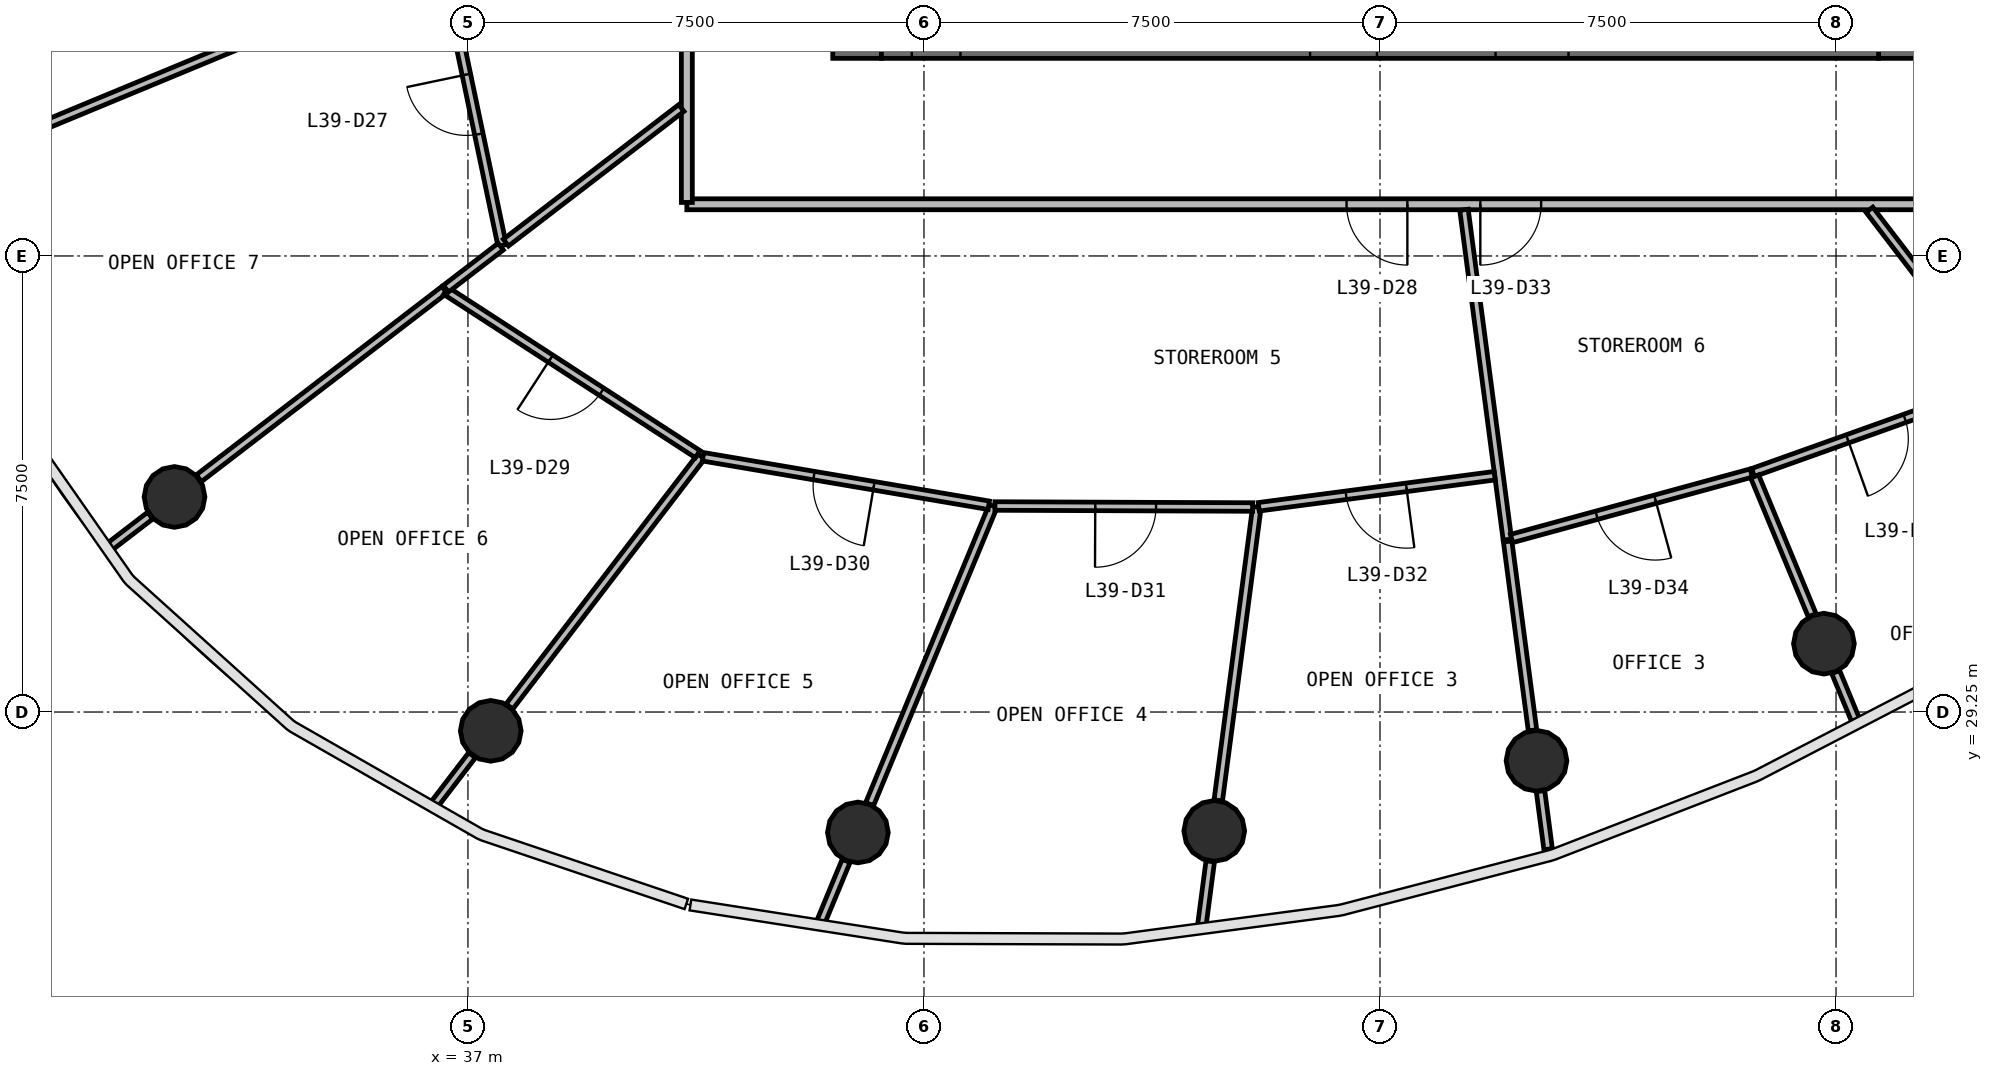
"""IFC4 building model, lengths in metres.
Left out: names, types, materials, properties, quantities, classifications, styles, units other than length and angle.
Written with IfcOpenShell. Run it as: python <this file> out.ifc"""

import sys

from ifc_helpers import new_model, si_unit, direction, frame, frame_2d, origin, origin_2d, place, context, subcontext, project, spatial, rectangle, circle, extrude, source, transform, mapped, element, fill, save


model = new_model("IFC4")
c1 = context("Model", 3, precision=1e-05, world=origin(), true_north=direction((0.0, 1.0)))
c2 = subcontext(c1, "Body", "Model", "MODEL_VIEW")
j1 = project(units=[si_unit("LENGTHUNIT", "METRE"), si_unit("PLANEANGLEUNIT", "RADIAN")], contexts=[c1])
p1 = place(None, origin())
s1 = spatial("IfcSite", under=j1, at=p1, CompositionType="ELEMENT")
p2 = place(p1, origin())
s2 = spatial("IfcBuilding", under=s1, at=p2, CompositionType="ELEMENT")
p3 = place(p2, frame((0.0, 0.0, 164.3)))
s3 = spatial("IfcBuildingStorey", under=s2, at=p3, CompositionType="ELEMENT", Elevation=164.3)
p4 = place(p3, frame((60.6, 40.0, 0.0), z_axis=(0.0, 0.0, 1.0), x_axis=(0.0, 1.0, 0.0)))
e1 = element("IfcWall", 1, at=p4, inside=s3, PredefinedType="SHEAR", context=c2, shape_type="SweptSolid", body=[
    extrude(rectangle(XDim=16.0, YDim=0.8, at=frame_2d((8.0, 0.0))), origin(), (0.0, 0.0, 1.0), 3.9),
])
p5 = place(p4, frame((7.1, 0.0, 0.0)))
e2 = element("IfcOpeningElement", 2, at=p5, cuts=e1, PredefinedType="OPENING", context=c2, shape_type="SweptSolid", body=[
    extrude(rectangle(XDim=1.8, YDim=2.1, at=frame_2d((0.9, 1.05))), frame((0.0, 0.41, 0.0), z_axis=(0.0, -1.0, 0.0), x_axis=(1.0, 0.0, 0.0)), (0.0, 0.0, 1.0), 0.82),
])
p6 = place(p3, frame((43.4, 56.0, 0.0), z_axis=(0.0, 0.0, 1.0), x_axis=(0.0, -1.0, 0.0)))
e3 = element("IfcWall", 3, at=p6, inside=s3, PredefinedType="SHEAR", context=c2, shape_type="SweptSolid", body=[
    extrude(rectangle(XDim=16.0, YDim=0.8, at=frame_2d((8.0, 0.0))), origin(), (0.0, 0.0, 1.0), 3.9),
])
p7 = place(p6, frame((7.1, 0.0, 0.0)))
e4 = element("IfcOpeningElement", 4, at=p7, cuts=e3, PredefinedType="OPENING", context=c2, shape_type="SweptSolid", body=[
    extrude(rectangle(XDim=1.8, YDim=2.1, at=frame_2d((0.9, 1.05))), frame((0.0, 0.41, 0.0), z_axis=(0.0, -1.0, 0.0), x_axis=(1.0, 0.0, 0.0)), (0.0, 0.0, 1.0), 0.82),
])
p8 = place(p3, frame((43.8, 40.4, 0.0), z_axis=(0.0, 0.0, 1.0), x_axis=(1.0, 0.0, 0.0)))
e5 = element("IfcWall", 5, at=p8, inside=s3, PredefinedType="SHEAR", context=c2, shape_type="SweptSolid", body=[
    extrude(rectangle(XDim=16.4, YDim=0.8, at=frame_2d((8.2, 0.0))), origin(), (0.0, 0.0, 1.0), 3.9),
])
p9 = place(p8, frame((10.1, 0.0, 0.0)))
e6 = element("IfcOpeningElement", 6, at=p9, cuts=e5, PredefinedType="OPENING", context=c2, shape_type="SweptSolid", body=[
    extrude(rectangle(XDim=1.2, YDim=2.1, at=frame_2d((0.6, 1.05))), frame((0.0, 0.41, 0.0), z_axis=(0.0, -1.0, 0.0), x_axis=(1.0, 0.0, 0.0)), (0.0, 0.0, 1.0), 0.82),
])
p10 = place(p8, frame((7.05, 0.0, 0.0)))
e7 = element("IfcOpeningElement", 7, at=p10, cuts=e5, PredefinedType="OPENING", context=c2, shape_type="SweptSolid", body=[
    extrude(rectangle(XDim=1.1, YDim=2.1, at=frame_2d((0.55, 1.05))), frame((0.0, 0.41, 0.0), z_axis=(0.0, -1.0, 0.0), x_axis=(1.0, 0.0, 0.0)), (0.0, 0.0, 1.0), 0.82),
])
p11 = place(p8, frame((0.5, 0.0, 0.0)))
e8 = element("IfcOpeningElement", 8, at=p11, cuts=e5, PredefinedType="OPENING", context=c2, shape_type="SweptSolid", body=[
    extrude(rectangle(XDim=0.8, YDim=2.1, at=frame_2d((0.4, 1.05))), frame((0.0, 0.41, 0.0), z_axis=(0.0, -1.0, 0.0), x_axis=(1.0, 0.0, 0.0)), (0.0, 0.0, 1.0), 0.82),
])
m1 = source(origin(), c2, "Body", "SweptSolid", [
    extrude(circle(Radius=0.5, at=origin_2d()), origin(), (0.0, 0.0, 1.0), 3.9),
])
for number, where, z_axis, x_axis in (
    (9, (32.174, 32.787, 0.0), (0.0, 0.0, 1.0), (1.0, 0.0, 0.0)),
    (10, (37.375, 28.94, 0.0), (0.0, 0.0, 1.0), (1.0, 0.0, 0.0)),
    (11, (43.413, 27.269, 0.0), (0.0, 0.0, 1.0), (1.0, 0.0, 0.0)),
    (12, (49.274, 27.295, 0.0), (0.0, 0.0, 1.0), (1.0, 0.0, 0.0)),
    (13, (54.574, 28.449, 0.0), (0.0, 0.0, 1.0), (1.0, 0.0, 0.0)),
    (14, (59.301, 30.374, 0.0), (0.0, 0.0, 1.0), (1.0, 0.0, 0.0)),
):
    element("IfcColumn", number, at=place(p3, frame(where, z_axis=z_axis, x_axis=x_axis)), inside=s3, PredefinedType="COLUMN", context=c2, shape_type="MappedRepresentation", body=[
        mapped(m1, transform((0.0, 0.0, 0.0), scale=1.0)),
    ])
p12 = place(p3, frame((63.4, 37.6, 0.0), z_axis=(0.0, 0.0, 1.0), x_axis=(-1.0, 0.0, 0.0)))
e15 = element("IfcWall", 15, at=p12, inside=s3, PredefinedType="PARTITIONING", context=c2, shape_type="SweptSolid", body=[
    extrude(rectangle(XDim=22.8, YDim=0.18, at=frame_2d((11.4, 0.0))), origin(), (0.0, 0.0, 1.0), 2.88),
])
p13 = place(p12, frame((10.95, 0.0, 0.0)))
e16 = element("IfcOpeningElement", 16, at=p13, cuts=e15, PredefinedType="OPENING", context=c2, shape_type="SweptSolid", body=[
    extrude(rectangle(XDim=1.0, YDim=2.1, at=frame_2d((0.5, 1.05))), frame((0.0, 0.1, 0.0), z_axis=(0.0, -1.0, 0.0), x_axis=(1.0, 0.0, 0.0)), (0.0, 0.0, 1.0), 0.2),
])
p14 = place(p12, frame((8.75, 0.0, 0.0)))
e17 = element("IfcOpeningElement", 17, at=p14, cuts=e15, PredefinedType="OPENING", context=c2, shape_type="SweptSolid", body=[
    extrude(rectangle(XDim=1.0, YDim=2.1, at=frame_2d((0.5, 1.05))), frame((0.0, 0.1, 0.0), z_axis=(0.0, -1.0, 0.0), x_axis=(1.0, 0.0, 0.0)), (0.0, 0.0, 1.0), 0.2),
])
p15 = place(p3, frame((40.6, 37.63, 0.0), z_axis=(0.0, 0.0, 1.0), x_axis=(0.0, 1.0, 0.0)))
e18 = element("IfcWall", 18, at=p15, inside=s3, PredefinedType="PARTITIONING", context=c2, shape_type="SweptSolid", body=[
    extrude(rectangle(XDim=20.74, YDim=0.18, at=frame_2d((10.37, 0.0))), origin(), (0.0, 0.0, 1.0), 2.88),
])
p16 = place(p15, frame((12.09, 0.0, 0.0)))
e19 = element("IfcOpeningElement", 19, at=p16, cuts=e18, PredefinedType="OPENING", context=c2, shape_type="SweptSolid", body=[
    extrude(rectangle(XDim=1.0, YDim=2.1, at=frame_2d((0.5, 1.05))), frame((0.0, 0.1, 0.0), z_axis=(0.0, -1.0, 0.0), x_axis=(1.0, 0.0, 0.0)), (0.0, 0.0, 1.0), 0.2),
])
p17 = place(p15, frame((9.89, 0.0, 0.0)))
e20 = element("IfcOpeningElement", 20, at=p17, cuts=e18, PredefinedType="OPENING", context=c2, shape_type="SweptSolid", body=[
    extrude(rectangle(XDim=1.0, YDim=2.1, at=frame_2d((0.5, 1.05))), frame((0.0, 0.1, 0.0), z_axis=(0.0, -1.0, 0.0), x_axis=(1.0, 0.0, 0.0)), (0.0, 0.0, 1.0), 0.2),
])
p18 = place(p3, frame((36.58, 41.613, 0.0), z_axis=(0.0, 0.0, 1.0), x_axis=(-0.923884663142, -0.382671045691, 0.0)))
e21 = element("IfcWall", 21, at=p18, inside=s3, PredefinedType="PARTITIONING", context=c2, shape_type="SweptSolid", body=[
    extrude(rectangle(XDim=7.047, YDim=0.14, at=frame_2d((3.523, 0.0))), origin(), (0.0, 0.0, 1.0), 2.88),
])
p19 = place(p3, frame((53.381, 37.51, 0.0), z_axis=(0.0, 0.0, 1.0), x_axis=(0.130500676988, -0.991448220184, 0.0)))
e22 = element("IfcWall", 22, at=p19, inside=s3, PredefinedType="PARTITIONING", context=c2, shape_type="SweptSolid", body=[
    extrude(rectangle(XDim=5.472, YDim=0.14, at=frame_2d((2.736, 0.0))), origin(), (0.0, 0.0, 1.0), 2.88),
])
p20 = place(p3, frame((45.637, 32.638, 0.0), z_axis=(0.0, 0.0, 1.0), x_axis=(-0.382690400947, -0.923876645999, 0.0)))
e23 = element("IfcWall", 23, at=p20, inside=s3, PredefinedType="PARTITIONING", context=c2, shape_type="SweptSolid", body=[
    extrude(rectangle(XDim=5.307, YDim=0.14, at=frame_2d((2.653, 0.0))), origin(), (0.0, 0.0, 1.0), 2.88),
])
p21 = place(p3, frame((40.837, 33.453, 0.0), z_axis=(0.0, 0.0, 1.0), x_axis=(-0.608781556018, -0.793337895888, 0.0)))
e24 = element("IfcWall", 24, at=p21, inside=s3, PredefinedType="PARTITIONING", context=c2, shape_type="SweptSolid", body=[
    extrude(rectangle(XDim=5.183, YDim=0.14, at=frame_2d((2.591, 0.0))), origin(), (0.0, 0.0, 1.0), 2.88),
])
p22 = place(p3, frame((36.614, 36.194, 0.0), z_axis=(0.0, 0.0, 1.0), x_axis=(-0.793380951851, -0.608725443234, 0.0)))
e25 = element("IfcWall", 25, at=p22, inside=s3, PredefinedType="PARTITIONING", context=c2, shape_type="SweptSolid", body=[
    extrude(rectangle(XDim=5.092, YDim=0.14, at=frame_2d((2.546, 0.0))), origin(), (0.0, 0.0, 1.0), 2.88),
])
p23 = place(p3, frame((40.779, 33.491, 0.0), z_axis=(0.0, 0.0, 1.0), x_axis=(-0.83885932545, 0.544348263619, 0.0)))
e26 = element("IfcWall", 26, at=p23, inside=s3, PredefinedType="PARTITIONING", context=c2, shape_type="SweptSolid", body=[
    extrude(rectangle(XDim=4.935, YDim=0.14, at=frame_2d((2.467, 0.0))), origin(), (0.0, 0.0, 1.0), 2.88),
])
p24 = place(p23, frame((1.885, 0.0, 0.0)))
e27 = element("IfcOpeningElement", 27, at=p24, cuts=e26, PredefinedType="OPENING", context=c2, shape_type="SweptSolid", body=[
    extrude(rectangle(XDim=1.0, YDim=2.1, at=frame_2d((0.5, 1.05))), frame((0.0, 0.08, 0.0), z_axis=(0.0, -1.0, 0.0), x_axis=(1.0, 0.0, 0.0)), (0.0, 0.0, 1.0), 0.16),
])
p25 = place(p3, frame((45.566, 32.65, 0.0), z_axis=(0.0, 0.0, 1.0), x_axis=(-0.985899482127, 0.167338612225, 0.0)))
e28 = element("IfcWall", 28, at=p25, inside=s3, PredefinedType="PARTITIONING", context=c2, shape_type="SweptSolid", body=[
    extrude(rectangle(XDim=4.766, YDim=0.14, at=frame_2d((2.383, 0.0))), origin(), (0.0, 0.0, 1.0), 2.88),
])
p26 = place(p25, frame((1.916, 0.0, 0.0)))
e29 = element("IfcOpeningElement", 29, at=p26, cuts=e28, PredefinedType="OPENING", context=c2, shape_type="SweptSolid", body=[
    extrude(rectangle(XDim=1.0, YDim=2.1, at=frame_2d((0.5, 1.05))), frame((0.0, 0.08, 0.0), z_axis=(0.0, -1.0, 0.0), x_axis=(1.0, 0.0, 0.0)), (0.0, 0.0, 1.0), 0.16),
])
p27 = place(p3, frame((49.975, 32.621, 0.0), z_axis=(0.0, 0.0, 1.0), x_axis=(-0.130550517866, -0.991441658538, 0.0)))
e30 = element("IfcWall", 30, at=p27, inside=s3, PredefinedType="PARTITIONING", context=c2, shape_type="SweptSolid", body=[
    extrude(rectangle(XDim=4.868, YDim=0.14, at=frame_2d((2.434, 0.0))), origin(), (0.0, 0.0, 1.0), 2.88),
])
p28 = place(p3, frame((37.563, 36.922, 0.0), z_axis=(0.0, 0.0, 1.0), x_axis=(-0.205017521869, 0.978758303018, 0.0)))
e31 = element("IfcWall", 31, at=p28, inside=s3, PredefinedType="PARTITIONING", context=c2, shape_type="SweptSolid", body=[
    extrude(rectangle(XDim=4.722, YDim=0.14, at=frame_2d((2.361, 0.0))), origin(), (0.0, 0.0, 1.0), 2.88),
])
p29 = place(p28, frame((1.872, 0.0, 0.0)))
e32 = element("IfcOpeningElement", 32, at=p29, cuts=e31, PredefinedType="OPENING", context=c2, shape_type="SweptSolid", body=[
    extrude(rectangle(XDim=1.0, YDim=2.1, at=frame_2d((0.5, 1.05))), frame((0.0, 0.08, 0.0), z_axis=(0.0, -1.0, 0.0), x_axis=(1.0, 0.0, 0.0)), (0.0, 0.0, 1.0), 0.16),
])
p30 = place(p3, frame((62.242, 34.653, 0.0), z_axis=(0.0, 0.0, 1.0), x_axis=(-0.94188625398, -0.335931964187, 0.0)))
e33 = element("IfcWall", 33, at=p30, inside=s3, PredefinedType="PARTITIONING", context=c2, shape_type="SweptSolid", body=[
    extrude(rectangle(XDim=4.36, YDim=0.14, at=frame_2d((2.18, 0.0))), origin(), (0.0, 0.0, 1.0), 2.88),
])
p31 = place(p30, frame((1.71, 0.0, 0.0)))
e34 = element("IfcOpeningElement", 34, at=p31, cuts=e33, PredefinedType="OPENING", context=c2, shape_type="SweptSolid", body=[
    extrude(rectangle(XDim=1.0, YDim=2.1, at=frame_2d((0.5, 1.05))), frame((0.0, 0.08, 0.0), z_axis=(0.0, -1.0, 0.0), x_axis=(1.0, 0.0, 0.0)), (0.0, 0.0, 1.0), 0.16),
])
p32 = place(p3, frame((49.905, 32.621, 0.0), z_axis=(0.0, 0.0, 1.0), x_axis=(-0.999992326677, 0.003917471956, 0.0)))
e35 = element("IfcWall", 35, at=p32, inside=s3, PredefinedType="PARTITIONING", context=c2, shape_type="SweptSolid", body=[
    extrude(rectangle(XDim=4.238, YDim=0.14, at=frame_2d((2.119, 0.0))), origin(), (0.0, 0.0, 1.0), 2.88),
])
p33 = place(p32, frame((1.588, 0.0, 0.0)))
e36 = element("IfcOpeningElement", 36, at=p33, cuts=e35, PredefinedType="OPENING", context=c2, shape_type="SweptSolid", body=[
    extrude(rectangle(XDim=1.0, YDim=2.1, at=frame_2d((0.5, 1.05))), frame((0.0, 0.08, 0.0), z_axis=(0.0, -1.0, 0.0), x_axis=(1.0, 0.0, 0.0)), (0.0, 0.0, 1.0), 0.16),
])
p34 = place(p3, frame((54.099, 32.055, 0.0), z_axis=(0.0, 0.0, 1.0), x_axis=(0.130525064179, -0.991445009883, 0.0)))
e37 = element("IfcWall", 37, at=p34, inside=s3, PredefinedType="PARTITIONING", context=c2, shape_type="SweptSolid", body=[
    extrude(rectangle(XDim=3.133, YDim=0.14, at=frame_2d((1.566, 0.0))), origin(), (0.0, 0.0, 1.0), 2.88),
])
p35 = place(p3, frame((58.106, 33.18, 0.0), z_axis=(0.0, 0.0, 1.0), x_axis=(-0.96465070337, -0.263531820636, 0.0)))
e38 = element("IfcWall", 38, at=p35, inside=s3, PredefinedType="PARTITIONING", context=c2, shape_type="SweptSolid", body=[
    extrude(rectangle(XDim=4.087, YDim=0.14, at=frame_2d((2.044, 0.0))), origin(), (0.0, 0.0, 1.0), 2.88),
])
p36 = place(p35, frame((1.637, 0.0, 0.0)))
e39 = element("IfcOpeningElement", 39, at=p36, cuts=e38, PredefinedType="OPENING", context=c2, shape_type="SweptSolid", body=[
    extrude(rectangle(XDim=1.0, YDim=2.1, at=frame_2d((0.5, 1.05))), frame((0.0, 0.08, 0.0), z_axis=(0.0, -1.0, 0.0), x_axis=(1.0, 0.0, 0.0)), (0.0, 0.0, 1.0), 0.16),
])
p37 = place(p3, frame((53.886, 33.136, 0.0), z_axis=(0.0, 0.0, 1.0), x_axis=(-0.991436881293, -0.130586792642, 0.0)))
e40 = element("IfcWall", 40, at=p37, inside=s3, PredefinedType="PARTITIONING", context=c2, shape_type="SweptSolid", body=[
    extrude(rectangle(XDim=3.915, YDim=0.14, at=frame_2d((1.958, 0.0))), origin(), (0.0, 0.0, 1.0), 2.88),
])
p38 = place(p37, frame((1.465, 0.0, 0.0)))
e41 = element("IfcOpeningElement", 41, at=p38, cuts=e40, PredefinedType="OPENING", context=c2, shape_type="SweptSolid", body=[
    extrude(rectangle(XDim=1.0, YDim=2.1, at=frame_2d((0.5, 1.05))), frame((0.0, 0.08, 0.0), z_axis=(0.0, -1.0, 0.0), x_axis=(1.0, 0.0, 0.0)), (0.0, 0.0, 1.0), 0.16),
])
p39 = place(p3, frame((40.51, 39.183, 0.0), z_axis=(0.0, 0.0, 1.0), x_axis=(-0.793354561545, -0.608759837436, 0.0)))
e42 = element("IfcWall", 42, at=p39, inside=s3, PredefinedType="PARTITIONING", context=c2, shape_type="SweptSolid", body=[
    extrude(rectangle(XDim=3.637, YDim=0.14, at=frame_2d((1.819, 0.0))), origin(), (0.0, 0.0, 1.0), 2.88),
])
p40 = place(p3, frame((60.049, 37.51, 0.0), z_axis=(0.0, 0.0, 1.0), x_axis=(0.608763032439, -0.793352109933, 0.0)))
e43 = element("IfcWall", 43, at=p40, inside=s3, PredefinedType="PARTITIONING", context=c2, shape_type="SweptSolid", body=[
    extrude(rectangle(XDim=3.076, YDim=0.14, at=frame_2d((1.538, 0.0))), origin(), (0.0, 0.0, 1.0), 2.88),
])
p41 = place(p3, frame((58.162, 33.124, 0.0), z_axis=(0.0, 0.0, 1.0), x_axis=(0.382692135528, -0.923875927495, 0.0)))
e44 = element("IfcWall", 44, at=p41, inside=s3, PredefinedType="PARTITIONING", context=c2, shape_type="SweptSolid", body=[
    extrude(rectangle(XDim=2.471, YDim=0.14, at=frame_2d((1.235, 0.0))), origin(), (0.0, 0.0, 1.0), 2.88),
])
p42 = place(p3, frame((37.539, 36.904, 0.0), z_axis=(0.0, 0.0, 1.0), x_axis=(-0.793326215903, -0.608796776569, 0.0)))
e45 = element("IfcWall", 45, at=p42, inside=s3, PredefinedType="PARTITIONING", context=c2, shape_type="SweptSolid", body=[
    extrude(rectangle(XDim=1.136, YDim=0.14, at=frame_2d((0.568, 0.0))), origin(), (0.0, 0.0, 1.0), 2.88),
])
p43 = place(p3, frame((43.22, 26.802, 0.0), z_axis=(0.0, 0.0, 1.0), x_axis=(-0.382724096228, -0.923862687939, 0.0)))
e46 = element("IfcWall", 46, at=p43, inside=s3, PredefinedType="PARTITIONING", context=c2, shape_type="SweptSolid", body=[
    extrude(rectangle(XDim=1.1, YDim=0.14, at=frame_2d((0.55, 0.0))), origin(), (0.0, 0.0, 1.0), 2.88),
])
p44 = place(p3, frame((49.208, 26.795, 0.0), z_axis=(0.0, 0.0, 1.0), x_axis=(-0.130561919254, -0.991440157166, 0.0)))
e47 = element("IfcWall", 47, at=p44, inside=s3, PredefinedType="PARTITIONING", context=c2, shape_type="SweptSolid", body=[
    extrude(rectangle(XDim=1.058, YDim=0.14, at=frame_2d((0.529, 0.0))), origin(), (0.0, 0.0, 1.0), 2.88),
])
p45 = place(p3, frame((37.068, 28.54, 0.0), z_axis=(0.0, 0.0, 1.0), x_axis=(-0.608710939512, -0.793392079692, 0.0)))
e48 = element("IfcWall", 48, at=p45, inside=s3, PredefinedType="PARTITIONING", context=c2, shape_type="SweptSolid", body=[
    extrude(rectangle(XDim=1.027, YDim=0.14, at=frame_2d((0.514, 0.0))), origin(), (0.0, 0.0, 1.0), 2.88),
])
p46 = place(p3, frame((54.64, 27.948, 0.0), z_axis=(0.0, 0.0, 1.0), x_axis=(0.130303682633, -0.991474129916, 0.0)))
e49 = element("IfcWall", 49, at=p46, inside=s3, PredefinedType="PARTITIONING", context=c2, shape_type="SweptSolid", body=[
    extrude(rectangle(XDim=0.963, YDim=0.14, at=frame_2d((0.481, 0.0))), origin(), (0.0, 0.0, 1.0), 2.88),
])
p47 = place(p3, frame((59.494, 29.908, 0.0), z_axis=(0.0, 0.0, 1.0), x_axis=(0.38261179702, -0.923909201589, 0.0)))
e50 = element("IfcWall", 50, at=p47, inside=s3, PredefinedType="PARTITIONING", context=c2, shape_type="SweptSolid", body=[
    extrude(rectangle(XDim=0.857, YDim=0.14, at=frame_2d((0.428, 0.0))), origin(), (0.0, 0.0, 1.0), 2.88),
])
p48 = place(p3, frame((31.774, 32.48, 0.0), z_axis=(0.0, 0.0, 1.0), x_axis=(-0.793240633291, -0.608908283484, 0.0)))
e51 = element("IfcWall", 51, at=p48, inside=s3, PredefinedType="PARTITIONING", context=c2, shape_type="SweptSolid", body=[
    extrude(rectangle(XDim=0.838, YDim=0.14, at=frame_2d((0.419, 0.0))), origin(), (0.0, 0.0, 1.0), 2.88),
])
m2 = source(origin(), c2, "Body", "SweptSolid", [
    extrude(rectangle(XDim=1.0, YDim=2.1, at=frame_2d((0.5, 1.05))), frame((0.0, 0.025, 0.0), z_axis=(0.0, -1.0, 0.0), x_axis=(1.0, 0.0, 0.0)), (0.0, 0.0, 1.0), 0.05),
])
p49 = place(p29, origin())
e52 = element("IfcDoor", 52, at=p49, inside=s3, OperationType="SINGLE_SWING_RIGHT", PredefinedType="DOOR", context=c2, shape_type="MappedRepresentation", body=[
    mapped(m2, transform((0.0, 0.0, 0.0), scale=1.0)),
])
fill(e32, e52)
p50 = place(p13, origin())
e53 = element("IfcDoor", 53, at=p50, inside=s3, OperationType="SINGLE_SWING_LEFT", PredefinedType="DOOR", context=c2, shape_type="MappedRepresentation", body=[
    mapped(m2, transform((0.0, 0.0, 0.0), scale=1.0)),
])
fill(e16, e53)
p51 = place(p24, origin())
e54 = element("IfcDoor", 54, at=p51, inside=s3, OperationType="SINGLE_SWING_RIGHT", PredefinedType="DOOR", context=c2, shape_type="MappedRepresentation", body=[
    mapped(m2, transform((0.0, 0.0, 0.0), scale=1.0)),
])
fill(e27, e54)
p52 = place(p26, origin())
e55 = element("IfcDoor", 55, at=p52, inside=s3, OperationType="SINGLE_SWING_LEFT", PredefinedType="DOOR", context=c2, shape_type="MappedRepresentation", body=[
    mapped(m2, transform((0.0, 0.0, 0.0), scale=1.0)),
])
fill(e29, e55)
p53 = place(p33, origin())
e56 = element("IfcDoor", 56, at=p53, inside=s3, OperationType="SINGLE_SWING_RIGHT", PredefinedType="DOOR", context=c2, shape_type="MappedRepresentation", body=[
    mapped(m2, transform((0.0, 0.0, 0.0), scale=1.0)),
])
fill(e36, e56)
p54 = place(p38, origin())
e57 = element("IfcDoor", 57, at=p54, inside=s3, OperationType="SINGLE_SWING_LEFT", PredefinedType="DOOR", context=c2, shape_type="MappedRepresentation", body=[
    mapped(m2, transform((0.0, 0.0, 0.0), scale=1.0)),
])
fill(e41, e57)
p55 = place(p14, origin())
e58 = element("IfcDoor", 58, at=p55, inside=s3, OperationType="SINGLE_SWING_RIGHT", PredefinedType="DOOR", context=c2, shape_type="MappedRepresentation", body=[
    mapped(m2, transform((0.0, 0.0, 0.0), scale=1.0)),
])
fill(e17, e58)
p56 = place(p36, origin())
e59 = element("IfcDoor", 59, at=p56, inside=s3, OperationType="SINGLE_SWING_LEFT", PredefinedType="DOOR", context=c2, shape_type="MappedRepresentation", body=[
    mapped(m2, transform((0.0, 0.0, 0.0), scale=1.0)),
])
fill(e39, e59)
p57 = place(p31, origin())
e60 = element("IfcDoor", 60, at=p57, inside=s3, OperationType="SINGLE_SWING_RIGHT", PredefinedType="DOOR", context=c2, shape_type="MappedRepresentation", body=[
    mapped(m2, transform((0.0, 0.0, 0.0), scale=1.0)),
])
fill(e34, e60)
save(model, sys.argv[1])
